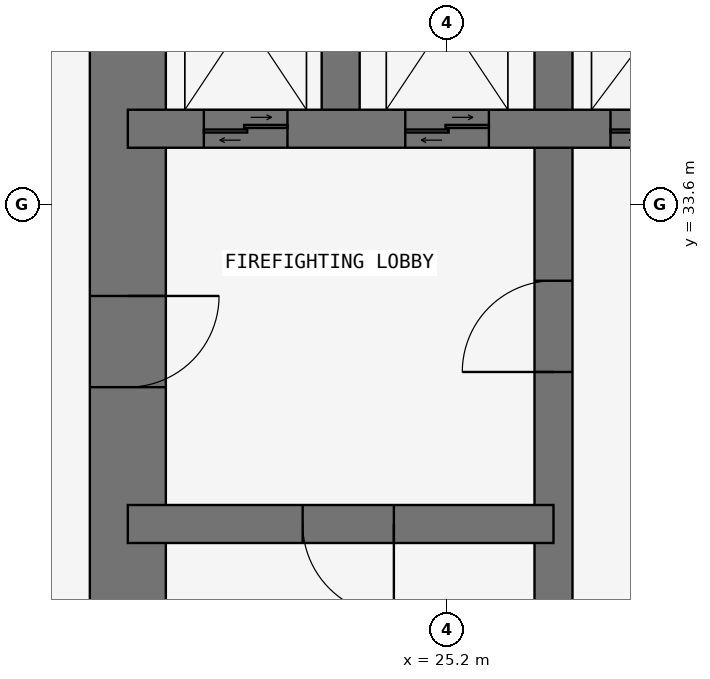
"""IFC4 building model, lengths in metres.
Left out: names, types, materials, properties, quantities, classifications, styles, units other than length and angle.
Written with IfcOpenShell. Run it as: python <this file> out.ifc"""

import sys

from ifc_helpers import new_model, si_unit, direction, frame, frame_2d, origin, place, context, subcontext, project, spatial, rectangle, extrude, element, fill, save


model = new_model("IFC4")
c1 = context("Model", 3, precision=1e-05, world=origin(), true_north=direction((0.0, 1.0)))
c2 = subcontext(c1, "Body", "Model", "MODEL_VIEW")
j1 = project(units=[si_unit("LENGTHUNIT", "METRE"), si_unit("PLANEANGLEUNIT", "RADIAN")], contexts=[c1])
p1 = place(None, origin())
s1 = spatial("IfcSite", under=j1, at=p1, CompositionType="ELEMENT")
p2 = place(p1, origin())
s2 = spatial("IfcBuilding", under=s1, at=p2, CompositionType="ELEMENT")
p3 = place(p2, frame((0.0, 0.0, 81.3)))
s3 = spatial("IfcBuildingStorey", under=s2, at=p3, CompositionType="ELEMENT", Elevation=81.3)
p4 = place(p3, frame((21.0, 37.8, 0.0), z_axis=(0.0, 0.0, 1.0), x_axis=(0.0, -1.0, 0.0)))
e1 = element("IfcWall", 1, at=p4, inside=s3, PredefinedType="SHEAR", context=c2, shape_type="SweptSolid", body=[
    extrude(rectangle(XDim=17.3, YDim=1.0, at=frame_2d((8.65, 0.0))), origin(), (0.0, 0.0, 1.0), 3.6),
])
p5 = place(p4, frame((5.4, 0.0, 0.0)))
e2 = element("IfcOpeningElement", 2, at=p5, cuts=e1, PredefinedType="OPENING", context=c2, shape_type="SweptSolid", body=[
    extrude(rectangle(XDim=1.2, YDim=2.1, at=frame_2d((0.6, 1.05))), frame((0.0, 0.51, 0.0), z_axis=(0.0, -1.0, 0.0), x_axis=(1.0, 0.0, 0.0)), (0.0, 0.0, 1.0), 1.02),
])
p6 = place(p3, frame((26.6, 21.0, 0.0), z_axis=(0.0, 0.0, 1.0), x_axis=(0.0, 1.0, 0.0)))
e3 = element("IfcWall", 3, at=p6, inside=s3, PredefinedType="SHEAR", context=c2, shape_type="SweptSolid", body=[
    extrude(rectangle(XDim=16.8, YDim=0.5, at=frame_2d((8.4, 0.0))), origin(), (0.0, 0.0, 1.0), 3.6),
])
p7 = place(p6, frame((10.4, 0.0, 0.0)))
e4 = element("IfcOpeningElement", 4, at=p7, cuts=e3, PredefinedType="OPENING", context=c2, shape_type="SweptSolid", body=[
    extrude(rectangle(XDim=1.2, YDim=2.1, at=frame_2d((0.6, 1.05))), frame((0.0, 0.26, 0.0), z_axis=(0.0, -1.0, 0.0), x_axis=(1.0, 0.0, 0.0)), (0.0, 0.0, 1.0), 0.52),
])
p8 = place(p3, frame((21.0, 29.4, 0.0), z_axis=(0.0, 0.0, 1.0), x_axis=(1.0, 0.0, 0.0)))
e5 = element("IfcWall", 5, at=p8, inside=s3, PredefinedType="SHEAR", context=c2, shape_type="SweptSolid", body=[
    extrude(rectangle(XDim=5.6, YDim=0.5, at=frame_2d((2.8, 0.0))), origin(), (0.0, 0.0, 1.0), 3.6),
])
p9 = place(p8, frame((2.3, 0.0, 0.0)))
e6 = element("IfcOpeningElement", 6, at=p9, cuts=e5, PredefinedType="OPENING", context=c2, shape_type="SweptSolid", body=[
    extrude(rectangle(XDim=1.2, YDim=2.1, at=frame_2d((0.6, 1.05))), frame((0.0, 0.26, 0.0), z_axis=(0.0, -1.0, 0.0), x_axis=(1.0, 0.0, 0.0)), (0.0, 0.0, 1.0), 0.52),
])
p10 = place(p3, frame((21.0, 34.6, 0.0), z_axis=(0.0, 0.0, 1.0), x_axis=(1.0, 0.0, 0.0)))
e7 = element("IfcWall", 7, at=p10, inside=s3, PredefinedType="SHEAR", context=c2, shape_type="SweptSolid", body=[
    extrude(rectangle(XDim=11.2, YDim=0.5, at=frame_2d((5.6, 0.0))), origin(), (0.0, 0.0, 1.0), 3.6),
])
p11 = place(p10, frame((9.35, 0.0, 0.0)))
e8 = element("IfcOpeningElement", 8, at=p11, cuts=e7, PredefinedType="OPENING", context=c2, shape_type="SweptSolid", body=[
    extrude(rectangle(XDim=0.9, YDim=2.1, at=frame_2d((0.45, 1.05))), frame((0.0, 0.26, 0.0), z_axis=(0.0, -1.0, 0.0), x_axis=(1.0, 0.0, 0.0)), (0.0, 0.0, 1.0), 0.52),
])
p12 = place(p10, frame((1.0, 0.0, 0.0)))
e9 = element("IfcOpeningElement", 9, at=p12, cuts=e7, PredefinedType="OPENING", context=c2, shape_type="SweptSolid", body=[
    extrude(rectangle(XDim=1.1, YDim=2.1, at=frame_2d((0.55, 1.05))), frame((0.0, 0.26, 0.0), z_axis=(0.0, -1.0, 0.0), x_axis=(1.0, 0.0, 0.0)), (0.0, 0.0, 1.0), 0.52),
])
p13 = place(p10, frame((3.65, 0.0, 0.0)))
e10 = element("IfcOpeningElement", 10, at=p13, cuts=e7, PredefinedType="OPENING", context=c2, shape_type="SweptSolid", body=[
    extrude(rectangle(XDim=1.1, YDim=2.1, at=frame_2d((0.55, 1.05))), frame((0.0, 0.26, 0.0), z_axis=(0.0, -1.0, 0.0), x_axis=(1.0, 0.0, 0.0)), (0.0, 0.0, 1.0), 0.52),
])
p14 = place(p10, frame((6.35, 0.0, 0.0)))
e11 = element("IfcOpeningElement", 11, at=p14, cuts=e7, PredefinedType="OPENING", context=c2, shape_type="SweptSolid", body=[
    extrude(rectangle(XDim=1.3, YDim=2.1, at=frame_2d((0.65, 1.05))), frame((0.0, 0.26, 0.0), z_axis=(0.0, -1.0, 0.0), x_axis=(1.0, 0.0, 0.0)), (0.0, 0.0, 1.0), 0.52),
])
p15 = place(p3, frame((23.8, 34.6, 0.0), z_axis=(0.0, 0.0, 1.0), x_axis=(0.0, 1.0, 0.0)))
e12 = element("IfcWall", 12, at=p15, inside=s3, PredefinedType="SHEAR", context=c2, shape_type="SweptSolid", body=[
    extrude(rectangle(XDim=3.2, YDim=0.5, at=frame_2d((1.6, 0.0))), origin(), (0.0, 0.0, 1.0), 3.6),
])
p16 = place(p5, origin())
e13 = element("IfcDoor", 13, at=p16, inside=s3, OperationType="SINGLE_SWING_LEFT", PredefinedType="DOOR", context=c2, shape_type="SweptSolid", body=[
    extrude(rectangle(XDim=1.2, YDim=2.1, at=frame_2d((0.6, 1.05))), frame((0.0, 0.025, 0.0), z_axis=(0.0, -1.0, 0.0), x_axis=(1.0, 0.0, 0.0)), (0.0, 0.0, 1.0), 0.05),
])
fill(e2, e13)
p17 = place(p9, frame((1.2, 0.0, 0.0), z_axis=(0.0, 0.0, 1.0), x_axis=(-1.0, 0.0, 0.0)))
e14 = element("IfcDoor", 14, at=p17, inside=s3, OperationType="SINGLE_SWING_LEFT", PredefinedType="DOOR", context=c2, shape_type="SweptSolid", body=[
    extrude(rectangle(XDim=1.2, YDim=2.1, at=frame_2d((0.6, 1.05))), frame((0.0, 0.025, 0.0), z_axis=(0.0, -1.0, 0.0), x_axis=(1.0, 0.0, 0.0)), (0.0, 0.0, 1.0), 0.05),
])
fill(e6, e14)
p18 = place(p7, origin())
e15 = element("IfcDoor", 15, at=p18, inside=s3, OperationType="SINGLE_SWING_LEFT", PredefinedType="DOOR", context=c2, shape_type="SweptSolid", body=[
    extrude(rectangle(XDim=1.2, YDim=2.1, at=frame_2d((0.6, 1.05))), frame((0.0, 0.025, 0.0), z_axis=(0.0, -1.0, 0.0), x_axis=(1.0, 0.0, 0.0)), (0.0, 0.0, 1.0), 0.05),
])
fill(e4, e15)
p19 = place(p12, origin())
e16 = element("IfcDoor", 16, at=p19, inside=s3, OperationType="DOUBLE_DOOR_SLIDING", PredefinedType="DOOR", context=c2, shape_type="SweptSolid", body=[
    extrude(rectangle(XDim=1.1, YDim=2.1, at=frame_2d((0.55, 1.05))), frame((0.0, 0.025, 0.0), z_axis=(0.0, -1.0, 0.0), x_axis=(1.0, 0.0, 0.0)), (0.0, 0.0, 1.0), 0.05),
])
fill(e9, e16)
p20 = place(p13, origin())
e17 = element("IfcDoor", 17, at=p20, inside=s3, OperationType="DOUBLE_DOOR_SLIDING", PredefinedType="DOOR", context=c2, shape_type="SweptSolid", body=[
    extrude(rectangle(XDim=1.1, YDim=2.1, at=frame_2d((0.55, 1.05))), frame((0.0, 0.025, 0.0), z_axis=(0.0, -1.0, 0.0), x_axis=(1.0, 0.0, 0.0)), (0.0, 0.0, 1.0), 0.05),
])
fill(e10, e17)
p21 = place(p14, origin())
e18 = element("IfcDoor", 18, at=p21, inside=s3, OperationType="DOUBLE_DOOR_SLIDING", PredefinedType="DOOR", context=c2, shape_type="SweptSolid", body=[
    extrude(rectangle(XDim=1.3, YDim=2.1, at=frame_2d((0.65, 1.05))), frame((0.0, 0.025, 0.0), z_axis=(0.0, -1.0, 0.0), x_axis=(1.0, 0.0, 0.0)), (0.0, 0.0, 1.0), 0.05),
])
fill(e11, e18)
save(model, sys.argv[1])
